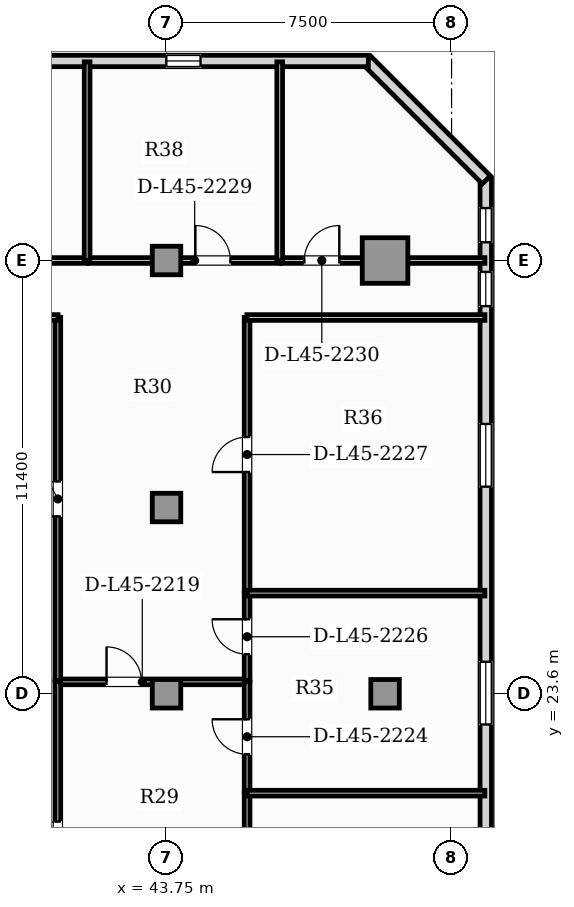
"""IFC4 building model, lengths in metres.
Left out: names, types, materials, properties, quantities, classifications, styles, units other than length and angle.
Written with IfcOpenShell. Run it as: python <this file> out.ifc"""

import sys

from ifc_helpers import new_model, si_unit, direction, frame, frame_2d, origin, origin_2d, place, context, subcontext, project, spatial, rectangle, hollow_rectangle, extrude, element, fill, save


model = new_model("IFC4")
c1 = context("Model", 3, precision=1e-05, world=origin(), true_north=direction((0.0, 1.0)))
c2 = subcontext(c1, "Body", "Model", "MODEL_VIEW")
j1 = project(units=[si_unit("LENGTHUNIT", "METRE"), si_unit("PLANEANGLEUNIT", "RADIAN")], contexts=[c1])
p1 = place(None, origin())
s1 = spatial("IfcSite", under=j1, at=p1, CompositionType="ELEMENT")
p2 = place(p1, origin())
s2 = spatial("IfcBuilding", under=s1, at=p2, CompositionType="ELEMENT")
p3 = place(p2, frame((0.0, 0.0, 183.7)))
s3 = spatial("IfcBuildingStorey", under=s2, at=p3, CompositionType="ELEMENT", Elevation=183.7)
p4 = place(p3, frame((49.5, 35.0, 0.0), z_axis=(0.0, 0.0, 1.0), x_axis=(1.0, 0.0, 0.0)))
e1 = element("IfcColumn", 1, at=p4, inside=s3, PredefinedType="USERDEFINED", context=c2, shape_type="SweptSolid", body=[
    extrude(hollow_rectangle(XDim=1.2, YDim=1.2, WallThickness=0.07, at=origin_2d()), origin(), (0.0, 0.0, 1.0), 3.85),
])
for number, where, z_axis, x_axis in (
    (2, (43.75, 23.6, 0.0), (0.0, 0.0, 1.0), (1.0, 0.0, 0.0)),
    (3, (49.5, 23.6, 0.0), (0.0, 0.0, 1.0), (1.0, 0.0, 0.0)),
    (4, (43.75, 28.5, 0.0), (0.0, 0.0, 1.0), (1.0, 0.0, 0.0)),
    (5, (43.75, 35.0, 0.0), (0.0, 0.0, 1.0), (1.0, 0.0, 0.0)),
):
    element("IfcColumn", number, at=place(p3, frame(where, z_axis=z_axis, x_axis=x_axis)), inside=s3, PredefinedType="COLUMN", context=c2, shape_type="SweptSolid", body=[
        extrude(rectangle(XDim=0.75, YDim=0.75, at=origin_2d()), origin(), (0.0, 0.0, 1.0), 3.85),
    ])
p5 = place(p3, frame((52.15, 3.24, 0.0), z_axis=(0.0, 0.0, 1.0), x_axis=(0.0, 1.0, 0.0)))
e6 = element("IfcWall", 6, at=p5, inside=s3, PredefinedType="SOLIDWALL", context=c2, shape_type="SweptSolid", body=[
    extrude(rectangle(XDim=33.92, YDim=0.3, at=frame_2d((16.96, 0.0))), origin(), (0.0, 0.0, 1.0), 3.63),
])
p6 = place(p5, frame((30.56, 0.0, 0.95)))
e7 = element("IfcOpeningElement", 7, at=p6, cuts=e6, PredefinedType="OPENING", context=c2, shape_type="SweptSolid", body=[
    extrude(rectangle(XDim=0.9, YDim=1.5, at=frame_2d((0.45, 0.75))), frame((0.0, 0.16, 0.0), z_axis=(0.0, -1.0, 0.0), x_axis=(1.0, 0.0, 0.0)), (0.0, 0.0, 1.0), 0.32),
])
p7 = place(p5, frame((11.056, 0.0, 0.95)))
e8 = element("IfcOpeningElement", 8, at=p7, cuts=e6, PredefinedType="OPENING", context=c2, shape_type="SweptSolid", body=[
    extrude(rectangle(XDim=0.9, YDim=1.5, at=frame_2d((0.45, 0.75))), frame((0.0, 0.16, 0.0), z_axis=(0.0, -1.0, 0.0), x_axis=(1.0, 0.0, 0.0)), (0.0, 0.0, 1.0), 0.32),
])
p8 = place(p5, frame((14.288, 0.0, 0.88)))
e9 = element("IfcOpeningElement", 9, at=p8, cuts=e6, PredefinedType="OPENING", context=c2, shape_type="SweptSolid", body=[
    extrude(rectangle(XDim=1.65, YDim=2.0, at=frame_2d((0.825, 1.0))), frame((0.0, 0.16, 0.0), z_axis=(0.0, -1.0, 0.0), x_axis=(1.0, 0.0, 0.0)), (0.0, 0.0, 1.0), 0.32),
])
p9 = place(p5, frame((19.552, 0.0, 0.88)))
e10 = element("IfcOpeningElement", 10, at=p9, cuts=e6, PredefinedType="OPENING", context=c2, shape_type="SweptSolid", body=[
    extrude(rectangle(XDim=1.65, YDim=2.0, at=frame_2d((0.825, 1.0))), frame((0.0, 0.16, 0.0), z_axis=(0.0, -1.0, 0.0), x_axis=(1.0, 0.0, 0.0)), (0.0, 0.0, 1.0), 0.32),
])
p10 = place(p5, frame((25.809, 0.0, 0.88)))
e11 = element("IfcOpeningElement", 11, at=p10, cuts=e6, PredefinedType="OPENING", context=c2, shape_type="SweptSolid", body=[
    extrude(rectangle(XDim=1.65, YDim=2.0, at=frame_2d((0.825, 1.0))), frame((0.0, 0.16, 0.0), z_axis=(0.0, -1.0, 0.0), x_axis=(1.0, 0.0, 0.0)), (0.0, 0.0, 1.0), 0.32),
])
p11 = place(p5, frame((32.24, 0.0, 0.95)))
e12 = element("IfcOpeningElement", 12, at=p11, cuts=e6, PredefinedType="OPENING", context=c2, shape_type="SweptSolid", body=[
    extrude(rectangle(XDim=0.9, YDim=1.5, at=frame_2d((0.45, 0.75))), frame((0.0, 0.16, 0.0), z_axis=(0.0, -1.0, 0.0), x_axis=(1.0, 0.0, 0.0)), (0.0, 0.0, 1.0), 0.32),
])
p12 = place(p3, frame((52.166, 37.122, 0.0), z_axis=(0.0, 0.0, 1.0), x_axis=(-0.707106781187, 0.707106781187, 0.0)))
e13 = element("IfcWall", 13, at=p12, inside=s3, PredefinedType="SOLIDWALL", context=c2, shape_type="SweptSolid", body=[
    extrude(rectangle(XDim=4.445, YDim=0.3, at=frame_2d((2.223, 0.0))), origin(), (0.0, 0.0, 1.0), 3.63),
])
p13 = place(p3, frame((49.06, 40.25, 0.0), z_axis=(0.0, 0.0, 1.0), x_axis=(-1.0, 0.0, 0.0)))
e14 = element("IfcWall", 14, at=p13, inside=s3, PredefinedType="SOLIDWALL", context=c2, shape_type="SweptSolid", body=[
    extrude(rectangle(XDim=14.07, YDim=0.3, at=frame_2d((7.035, 0.0))), origin(), (0.0, 0.0, 1.0), 3.085),
])
p14 = place(p13, frame((9.628, 0.0, 0.85)))
e15 = element("IfcOpeningElement", 15, at=p14, cuts=e14, PredefinedType="OPENING", context=c2, shape_type="SweptSolid", body=[
    extrude(rectangle(XDim=0.9, YDim=1.4, at=frame_2d((0.45, 0.7))), frame((0.0, 0.16, 0.0), z_axis=(0.0, -1.0, 0.0), x_axis=(1.0, 0.0, 0.0)), (0.0, 0.0, 1.0), 0.32),
])
p15 = place(p13, frame((4.416, 0.0, 0.85)))
e16 = element("IfcOpeningElement", 16, at=p15, cuts=e14, PredefinedType="OPENING", context=c2, shape_type="SweptSolid", body=[
    extrude(rectangle(XDim=0.9, YDim=1.4, at=frame_2d((0.45, 0.7))), frame((0.0, 0.16, 0.0), z_axis=(0.0, -1.0, 0.0), x_axis=(1.0, 0.0, 0.0)), (0.0, 0.0, 1.0), 0.32),
])
p16 = place(p3, frame((40.885, 23.913, 0.0), z_axis=(0.0, 0.0, 1.0), x_axis=(1.0, 0.0, 0.0)))
e17 = element("IfcWall", 17, at=p16, inside=s3, PredefinedType="PARTITIONING", context=c2, shape_type="SweptSolid", body=[
    extrude(rectangle(XDim=4.99, YDim=0.15, at=frame_2d((2.495, 0.0))), origin(), (0.0, 0.0, 1.0), 3.63),
])
p17 = place(p16, frame((1.287, 0.0, 0.0)))
e18 = element("IfcOpeningElement", 18, at=p17, cuts=e17, PredefinedType="OPENING", context=c2, shape_type="SweptSolid", body=[
    extrude(rectangle(XDim=0.92, YDim=2.1, at=frame_2d((0.46, 1.05))), frame((0.0, 0.085, 0.0), z_axis=(0.0, -1.0, 0.0), x_axis=(1.0, 0.0, 0.0)), (0.0, 0.0, 1.0), 0.17),
])
p18 = place(p3, frame((40.89, 15.635, 0.0), z_axis=(0.0, 0.0, 1.0), x_axis=(0.0, 1.0, 0.0)))
e19 = element("IfcWall", 19, at=p18, inside=s3, PredefinedType="PARTITIONING", context=c2, shape_type="SweptSolid", body=[
    extrude(rectangle(XDim=8.283, YDim=0.15, at=frame_2d((4.142, 0.0))), origin(), (0.0, 0.0, 1.0), 3.63),
])
p19 = place(p18, frame((3.682, 0.0, 0.0)))
e20 = element("IfcOpeningElement", 20, at=p19, cuts=e19, PredefinedType="OPENING", context=c2, shape_type="SweptSolid", body=[
    extrude(rectangle(XDim=0.92, YDim=2.1, at=frame_2d((0.46, 1.05))), frame((0.0, 0.085, 0.0), z_axis=(0.0, -1.0, 0.0), x_axis=(1.0, 0.0, 0.0)), (0.0, 0.0, 1.0), 0.17),
])
p20 = place(p3, frame((45.87, 15.756, 0.0), z_axis=(0.0, 0.0, 1.0), x_axis=(0.0, 1.0, 0.0)))
e21 = element("IfcWall", 21, at=p20, inside=s3, PredefinedType="PARTITIONING", context=c2, shape_type="SweptSolid", body=[
    extrude(rectangle(XDim=5.234, YDim=0.15, at=frame_2d((2.617, 0.0))), origin(), (0.0, 0.0, 1.0), 3.63),
])
p21 = place(p20, frame((2.157, 0.0, 0.0)))
e22 = element("IfcOpeningElement", 22, at=p21, cuts=e21, PredefinedType="OPENING", context=c2, shape_type="SweptSolid", body=[
    extrude(rectangle(XDim=0.92, YDim=2.1, at=frame_2d((0.46, 1.05))), frame((0.0, 0.085, 0.0), z_axis=(0.0, -1.0, 0.0), x_axis=(1.0, 0.0, 0.0)), (0.0, 0.0, 1.0), 0.17),
])
p22 = place(p3, frame((45.87, 21.02, 0.0), z_axis=(0.0, 0.0, 1.0), x_axis=(0.0, 1.0, 0.0)))
e23 = element("IfcWall", 23, at=p22, inside=s3, PredefinedType="PARTITIONING", context=c2, shape_type="SweptSolid", body=[
    extrude(rectangle(XDim=2.898, YDim=0.15, at=frame_2d((1.449, 0.0))), origin(), (0.0, 0.0, 1.0), 3.63),
])
p23 = place(p22, frame((0.989, 0.0, 0.0)))
e24 = element("IfcOpeningElement", 24, at=p23, cuts=e23, PredefinedType="OPENING", context=c2, shape_type="SweptSolid", body=[
    extrude(rectangle(XDim=0.92, YDim=2.1, at=frame_2d((0.46, 1.05))), frame((0.0, 0.085, 0.0), z_axis=(0.0, -1.0, 0.0), x_axis=(1.0, 0.0, 0.0)), (0.0, 0.0, 1.0), 0.17),
])
p24 = place(p3, frame((40.89, 23.948, 0.0), z_axis=(0.0, 0.0, 1.0), x_axis=(0.0, 1.0, 0.0)))
e25 = element("IfcWall", 25, at=p24, inside=s3, PredefinedType="PARTITIONING", context=c2, shape_type="SweptSolid", body=[
    extrude(rectangle(XDim=9.557, YDim=0.15, at=frame_2d((4.778, 0.0))), origin(), (0.0, 0.0, 1.0), 3.63),
])
p25 = place(p24, frame((4.318, 0.0, 0.0)))
e26 = element("IfcOpeningElement", 26, at=p25, cuts=e25, PredefinedType="OPENING", context=c2, shape_type="SweptSolid", body=[
    extrude(rectangle(XDim=0.92, YDim=2.1, at=frame_2d((0.46, 1.05))), frame((0.0, 0.085, 0.0), z_axis=(0.0, -1.0, 0.0), x_axis=(1.0, 0.0, 0.0)), (0.0, 0.0, 1.0), 0.17),
])
p26 = place(p3, frame((35.285, 33.5, 0.0), z_axis=(0.0, 0.0, 1.0), x_axis=(1.0, 0.0, 0.0)))
e27 = element("IfcWall", 27, at=p26, inside=s3, PredefinedType="PARTITIONING", context=c2, shape_type="SweptSolid", body=[
    extrude(rectangle(XDim=5.61, YDim=0.15, at=frame_2d((2.805, 0.0))), origin(), (0.0, 0.0, 1.0), 3.63),
])
p27 = place(p3, frame((45.87, 23.948, 0.0), z_axis=(0.0, 0.0, 1.0), x_axis=(0.0, 1.0, 0.0)))
e28 = element("IfcWall", 28, at=p27, inside=s3, PredefinedType="PARTITIONING", context=c2, shape_type="SweptSolid", body=[
    extrude(rectangle(XDim=2.305, YDim=0.15, at=frame_2d((1.153, 0.0))), origin(), (0.0, 0.0, 1.0), 3.63),
])
p28 = place(p27, frame((0.693, 0.0, 0.0)))
e29 = element("IfcOpeningElement", 29, at=p28, cuts=e28, PredefinedType="OPENING", context=c2, shape_type="SweptSolid", body=[
    extrude(rectangle(XDim=0.92, YDim=2.1, at=frame_2d((0.46, 1.05))), frame((0.0, 0.085, 0.0), z_axis=(0.0, -1.0, 0.0), x_axis=(1.0, 0.0, 0.0)), (0.0, 0.0, 1.0), 0.17),
])
p29 = place(p3, frame((45.87, 26.284, 0.0), z_axis=(0.0, 0.0, 1.0), x_axis=(0.0, 1.0, 0.0)))
e30 = element("IfcWall", 30, at=p29, inside=s3, PredefinedType="PARTITIONING", context=c2, shape_type="SweptSolid", body=[
    extrude(rectangle(XDim=7.221, YDim=0.15, at=frame_2d((3.611, 0.0))), origin(), (0.0, 0.0, 1.0), 3.63),
])
p30 = place(p29, frame((3.151, 0.0, 0.0)))
e31 = element("IfcOpeningElement", 31, at=p30, cuts=e30, PredefinedType="OPENING", context=c2, shape_type="SweptSolid", body=[
    extrude(rectangle(XDim=0.92, YDim=2.1, at=frame_2d((0.46, 1.05))), frame((0.0, 0.085, 0.0), z_axis=(0.0, -1.0, 0.0), x_axis=(1.0, 0.0, 0.0)), (0.0, 0.0, 1.0), 0.17),
])
p31 = place(p3, frame((45.865, 33.5, 0.0), z_axis=(0.0, 0.0, 1.0), x_axis=(1.0, 0.0, 0.0)))
e32 = element("IfcWall", 32, at=p31, inside=s3, PredefinedType="PARTITIONING", context=c2, shape_type="SweptSolid", body=[
    extrude(rectangle(XDim=6.262, YDim=0.15, at=frame_2d((3.131, 0.0))), origin(), (0.0, 0.0, 1.0), 3.63),
])
p32 = place(p3, frame((35.285, 35.0, 0.0), z_axis=(0.0, 0.0, 1.0), x_axis=(1.0, 0.0, 0.0)))
e33 = element("IfcWall", 33, at=p32, inside=s3, PredefinedType="PARTITIONING", context=c2, shape_type="SweptSolid", body=[
    extrude(rectangle(XDim=6.381, YDim=0.15, at=frame_2d((3.19, 0.0))), origin(), (0.0, 0.0, 1.0), 3.013),
])
p33 = place(p32, frame((2.73, 0.0, 0.0)))
e34 = element("IfcOpeningElement", 34, at=p33, cuts=e33, PredefinedType="OPENING", context=c2, shape_type="SweptSolid", body=[
    extrude(rectangle(XDim=0.92, YDim=2.1, at=frame_2d((0.46, 1.05))), frame((0.0, 0.085, 0.0), z_axis=(0.0, -1.0, 0.0), x_axis=(1.0, 0.0, 0.0)), (0.0, 0.0, 1.0), 0.17),
])
p34 = place(p3, frame((41.696, 35.0, 0.0), z_axis=(0.0, 0.0, 1.0), x_axis=(1.0, 0.0, 0.0)))
e35 = element("IfcWall", 35, at=p34, inside=s3, PredefinedType="PARTITIONING", context=c2, shape_type="SweptSolid", body=[
    extrude(rectangle(XDim=5.038, YDim=0.15, at=frame_2d((2.519, 0.0))), origin(), (0.0, 0.0, 1.0), 3.013),
])
p35 = place(p34, frame((2.814, 0.0, 0.0)))
e36 = element("IfcOpeningElement", 36, at=p35, cuts=e35, PredefinedType="OPENING", context=c2, shape_type="SweptSolid", body=[
    extrude(rectangle(XDim=0.92, YDim=2.1, at=frame_2d((0.46, 1.05))), frame((0.0, 0.085, 0.0), z_axis=(0.0, -1.0, 0.0), x_axis=(1.0, 0.0, 0.0)), (0.0, 0.0, 1.0), 0.17),
])
p36 = place(p3, frame((46.763, 35.0, 0.0), z_axis=(0.0, 0.0, 1.0), x_axis=(1.0, 0.0, 0.0)))
e37 = element("IfcWall", 37, at=p36, inside=s3, PredefinedType="PARTITIONING", context=c2, shape_type="SweptSolid", body=[
    extrude(rectangle(XDim=5.364, YDim=0.15, at=frame_2d((2.682, 0.0))), origin(), (0.0, 0.0, 1.0), 3.013),
])
p37 = place(p36, frame((0.613, 0.0, 0.0)))
e38 = element("IfcOpeningElement", 38, at=p37, cuts=e37, PredefinedType="OPENING", context=c2, shape_type="SweptSolid", body=[
    extrude(rectangle(XDim=0.92, YDim=2.1, at=frame_2d((0.46, 1.05))), frame((0.0, 0.085, 0.0), z_axis=(0.0, -1.0, 0.0), x_axis=(1.0, 0.0, 0.0)), (0.0, 0.0, 1.0), 0.17),
])
for number, where, z_axis, x_axis in (
    (39, (45.865, 20.985, 0.0), (0.0, 0.0, 1.0), (1.0, 0.0, 0.0)),
    (40, (45.865, 26.249, 0.0), (0.0, 0.0, 1.0), (1.0, 0.0, 0.0)),
):
    element("IfcWall", number, at=place(p3, frame(where, z_axis=z_axis, x_axis=x_axis)), inside=s3, PredefinedType="PARTITIONING", context=c2, shape_type="SweptSolid", body=[
        extrude(rectangle(XDim=6.262, YDim=0.15, at=frame_2d((3.131, 0.0))), origin(), (0.0, 0.0, 1.0), 3.63),
    ])
for number, where, z_axis, x_axis in (
    (41, (41.661, 34.995, 0.0), (0.0, 0.0, 1.0), (0.0, 1.0, 0.0)),
    (42, (46.728, 34.995, 0.0), (0.0, 0.0, 1.0), (0.0, 1.0, 0.0)),
):
    element("IfcWall", number, at=place(p3, frame(where, z_axis=z_axis, x_axis=x_axis)), inside=s3, PredefinedType="PARTITIONING", context=c2, shape_type="SweptSolid", body=[
        extrude(rectangle(XDim=5.232, YDim=0.15, at=frame_2d((2.616, 0.0))), origin(), (0.0, 0.0, 1.0), 3.63),
    ])
p38 = place(p6, origin())
e43 = element("IfcWindow", 43, at=p38, inside=s3, PartitioningType="SINGLE_PANEL", PredefinedType="WINDOW", context=c2, shape_type="SweptSolid", body=[
    extrude(rectangle(XDim=0.9, YDim=1.5, at=frame_2d((0.45, 0.75))), frame((0.0, 0.03, 0.0), z_axis=(0.0, -1.0, 0.0), x_axis=(1.0, 0.0, 0.0)), (0.0, 0.0, 1.0), 0.06),
])
fill(e7, e43)
p39 = place(p9, origin())
e44 = element("IfcWindow", 44, at=p39, inside=s3, PartitioningType="SINGLE_PANEL", PredefinedType="WINDOW", context=c2, shape_type="SweptSolid", body=[
    extrude(rectangle(XDim=1.65, YDim=2.0, at=frame_2d((0.825, 1.0))), frame((0.0, 0.03, 0.0), z_axis=(0.0, -1.0, 0.0), x_axis=(1.0, 0.0, 0.0)), (0.0, 0.0, 1.0), 0.06),
])
fill(e10, e44)
p40 = place(p10, origin())
e45 = element("IfcWindow", 45, at=p40, inside=s3, PartitioningType="SINGLE_PANEL", PredefinedType="WINDOW", context=c2, shape_type="SweptSolid", body=[
    extrude(rectangle(XDim=1.65, YDim=2.0, at=frame_2d((0.825, 1.0))), frame((0.0, 0.03, 0.0), z_axis=(0.0, -1.0, 0.0), x_axis=(1.0, 0.0, 0.0)), (0.0, 0.0, 1.0), 0.06),
])
fill(e11, e45)
p41 = place(p15, origin())
e46 = element("IfcWindow", 46, at=p41, inside=s3, PartitioningType="SINGLE_PANEL", PredefinedType="WINDOW", context=c2, shape_type="SweptSolid", body=[
    extrude(rectangle(XDim=0.9, YDim=1.4, at=frame_2d((0.45, 0.7))), frame((0.0, 0.03, 0.0), z_axis=(0.0, -1.0, 0.0), x_axis=(1.0, 0.0, 0.0)), (0.0, 0.0, 1.0), 0.06),
])
fill(e16, e46)
p42 = place(p11, origin())
e47 = element("IfcWindow", 47, at=p42, inside=s3, PartitioningType="SINGLE_PANEL", PredefinedType="WINDOW", context=c2, shape_type="SweptSolid", body=[
    extrude(rectangle(XDim=0.9, YDim=1.5, at=frame_2d((0.45, 0.75))), frame((0.0, 0.03, 0.0), z_axis=(0.0, -1.0, 0.0), x_axis=(1.0, 0.0, 0.0)), (0.0, 0.0, 1.0), 0.06),
])
fill(e12, e47)
p43 = place(p17, origin())
e48 = element("IfcDoor", 48, at=p43, inside=s3, OperationType="SINGLE_SWING_LEFT", PredefinedType="DOOR", context=c2, shape_type="SweptSolid", body=[
    extrude(rectangle(XDim=0.92, YDim=2.1, at=frame_2d((0.46, 1.05))), frame((0.0, 0.025, 0.0), z_axis=(0.0, -1.0, 0.0), x_axis=(1.0, 0.0, 0.0)), (0.0, 0.0, 1.0), 0.05),
])
fill(e18, e48)
p44 = place(p19, origin())
e49 = element("IfcDoor", 49, at=p44, inside=s3, OperationType="SINGLE_SWING_LEFT", PredefinedType="DOOR", context=c2, shape_type="SweptSolid", body=[
    extrude(rectangle(XDim=0.92, YDim=2.1, at=frame_2d((0.46, 1.05))), frame((0.0, 0.025, 0.0), z_axis=(0.0, -1.0, 0.0), x_axis=(1.0, 0.0, 0.0)), (0.0, 0.0, 1.0), 0.05),
])
fill(e20, e49)
p45 = place(p23, origin())
e50 = element("IfcDoor", 50, at=p45, inside=s3, OperationType="SINGLE_SWING_RIGHT", PredefinedType="DOOR", context=c2, shape_type="SweptSolid", body=[
    extrude(rectangle(XDim=0.92, YDim=2.1, at=frame_2d((0.46, 1.05))), frame((0.0, 0.025, 0.0), z_axis=(0.0, -1.0, 0.0), x_axis=(1.0, 0.0, 0.0)), (0.0, 0.0, 1.0), 0.05),
])
fill(e24, e50)
p46 = place(p25, origin())
e51 = element("IfcDoor", 51, at=p46, inside=s3, OperationType="SINGLE_SWING_LEFT", PredefinedType="DOOR", context=c2, shape_type="SweptSolid", body=[
    extrude(rectangle(XDim=0.92, YDim=2.1, at=frame_2d((0.46, 1.05))), frame((0.0, 0.025, 0.0), z_axis=(0.0, -1.0, 0.0), x_axis=(1.0, 0.0, 0.0)), (0.0, 0.0, 1.0), 0.05),
])
fill(e26, e51)
p47 = place(p28, origin())
e52 = element("IfcDoor", 52, at=p47, inside=s3, OperationType="SINGLE_SWING_RIGHT", PredefinedType="DOOR", context=c2, shape_type="SweptSolid", body=[
    extrude(rectangle(XDim=0.92, YDim=2.1, at=frame_2d((0.46, 1.05))), frame((0.0, 0.025, 0.0), z_axis=(0.0, -1.0, 0.0), x_axis=(1.0, 0.0, 0.0)), (0.0, 0.0, 1.0), 0.05),
])
fill(e29, e52)
p48 = place(p30, origin())
e53 = element("IfcDoor", 53, at=p48, inside=s3, OperationType="SINGLE_SWING_LEFT", PredefinedType="DOOR", context=c2, shape_type="SweptSolid", body=[
    extrude(rectangle(XDim=0.92, YDim=2.1, at=frame_2d((0.46, 1.05))), frame((0.0, 0.025, 0.0), z_axis=(0.0, -1.0, 0.0), x_axis=(1.0, 0.0, 0.0)), (0.0, 0.0, 1.0), 0.05),
])
fill(e31, e53)
p49 = place(p35, origin())
e54 = element("IfcDoor", 54, at=p49, inside=s3, OperationType="SINGLE_SWING_LEFT", PredefinedType="DOOR", context=c2, shape_type="SweptSolid", body=[
    extrude(rectangle(XDim=0.92, YDim=2.1, at=frame_2d((0.46, 1.05))), frame((0.0, 0.025, 0.0), z_axis=(0.0, -1.0, 0.0), x_axis=(1.0, 0.0, 0.0)), (0.0, 0.0, 1.0), 0.05),
])
fill(e36, e54)
p50 = place(p37, origin())
e55 = element("IfcDoor", 55, at=p50, inside=s3, OperationType="SINGLE_SWING_RIGHT", PredefinedType="DOOR", context=c2, shape_type="SweptSolid", body=[
    extrude(rectangle(XDim=0.92, YDim=2.1, at=frame_2d((0.46, 1.05))), frame((0.0, 0.025, 0.0), z_axis=(0.0, -1.0, 0.0), x_axis=(1.0, 0.0, 0.0)), (0.0, 0.0, 1.0), 0.05),
])
fill(e38, e55)
save(model, sys.argv[1])
